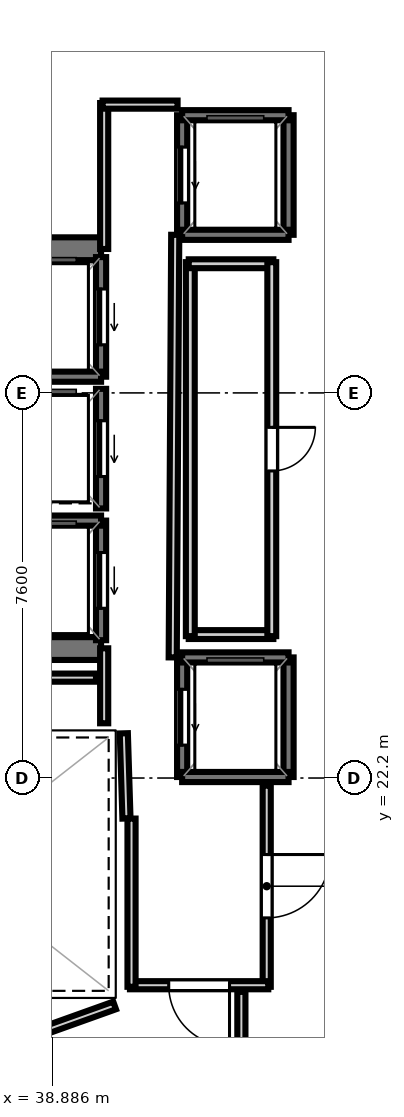
"""IFC4 building model, lengths in metres.
Left out: names, types, materials, properties, quantities, classifications, styles, units other than length and angle.
Written with IfcOpenShell. Run it as: python <this file> out.ifc"""

import sys

from ifc_helpers import new_model, si_unit, direction, frame, frame_2d, origin, place, context, subcontext, project, spatial, rectangle, extrude, element, fill, save


model = new_model("IFC4")
c1 = context("Model", 3, precision=1e-05, world=origin(), true_north=direction((0.0, 1.0)))
c2 = subcontext(c1, "Body", "Model", "MODEL_VIEW")
j1 = project(units=[si_unit("LENGTHUNIT", "METRE"), si_unit("PLANEANGLEUNIT", "RADIAN")], contexts=[c1])
p1 = place(None, origin())
s1 = spatial("IfcSite", under=j1, at=p1, CompositionType="ELEMENT")
p2 = place(p1, origin())
s2 = spatial("IfcBuilding", under=s1, at=p2, CompositionType="ELEMENT")
p3 = place(p2, frame((0.0, 0.0, 348.1)))
s3 = spatial("IfcBuildingStorey", under=s2, at=p3, CompositionType="ELEMENT", Elevation=348.1)
p4 = place(p3, frame((29.33, 32.645, 0.0), z_axis=(0.0, 0.0, 1.0), x_axis=(1.0, 0.0, 0.0)))
e1 = element("IfcWall", 1, at=p4, inside=s3, PredefinedType="SHEAR", context=c2, shape_type="SweptSolid", body=[
    extrude(rectangle(XDim=10.52, YDim=0.45, at=frame_2d((5.26, 0.0))), origin(), (0.0, 0.0, 1.0), 3.4),
])
p5 = place(p4, frame((0.895, 0.0, 0.0)))
e2 = element("IfcOpeningElement", 2, at=p5, cuts=e1, PredefinedType="OPENING", context=c2, shape_type="SweptSolid", body=[
    extrude(rectangle(XDim=1.25, YDim=2.15, at=frame_2d((0.625, 1.075))), frame((0.0, 0.235, 0.0), z_axis=(0.0, -1.0, 0.0), x_axis=(1.0, 0.0, 0.0)), (0.0, 0.0, 1.0), 0.47),
])
p6 = place(p3, frame((29.33, 24.755, 0.0), z_axis=(0.0, 0.0, 1.0), x_axis=(1.0, 0.0, 0.0)))
e3 = element("IfcWall", 3, at=p6, inside=s3, PredefinedType="SHEAR", context=c2, shape_type="SweptSolid", body=[
    extrude(rectangle(XDim=10.52, YDim=0.45, at=frame_2d((5.26, 0.0))), origin(), (0.0, 0.0, 1.0), 3.4),
])
p7 = place(p6, frame((0.695, 0.0, 0.0)))
e4 = element("IfcOpeningElement", 4, at=p7, cuts=e3, PredefinedType="OPENING", context=c2, shape_type="SweptSolid", body=[
    extrude(rectangle(XDim=1.25, YDim=2.15, at=frame_2d((0.625, 1.075))), frame((0.0, 0.235, 0.0), z_axis=(0.0, -1.0, 0.0), x_axis=(1.0, 0.0, 0.0)), (0.0, 0.0, 1.0), 0.47),
])
p8 = place(p3, frame((39.85, 30.12, 0.0), z_axis=(0.0, 0.0, 1.0), x_axis=(0.0, 1.0, 0.0)))
e5 = element("IfcWall", 5, at=p8, inside=s3, PredefinedType="SOLIDWALL", context=c2, shape_type="SweptSolid", body=[
    extrude(rectangle(XDim=2.36, YDim=0.2, at=frame_2d((1.18, 0.0))), origin(), (0.0, 0.0, 1.0), 3.4),
])
p9 = place(p8, frame((0.63, 0.0, 0.0)))
e6 = element("IfcOpeningElement", 6, at=p9, cuts=e5, PredefinedType="OPENING", context=c2, shape_type="SweptSolid", body=[
    extrude(rectangle(XDim=1.1, YDim=2.15, at=frame_2d((0.55, 1.075))), frame((0.0, 0.11, 0.0), z_axis=(0.0, -1.0, 0.0), x_axis=(1.0, 0.0, 0.0)), (0.0, 0.0, 1.0), 0.22),
])
p10 = place(p3, frame((37.75, 30.12, 0.0), z_axis=(0.0, 0.0, 1.0), x_axis=(1.0, 0.0, 0.0)))
e7 = element("IfcWall", 7, at=p10, inside=s3, PredefinedType="SOLIDWALL", context=c2, shape_type="SweptSolid", body=[
    extrude(rectangle(XDim=2.1, YDim=0.2, at=frame_2d((1.05, 0.0))), origin(), (0.0, 0.0, 1.0), 3.4),
])
p11 = place(p3, frame((39.85, 24.92, 0.0), z_axis=(0.0, 0.0, 1.0), x_axis=(0.0, 1.0, 0.0)))
e8 = element("IfcWall", 8, at=p11, inside=s3, PredefinedType="SOLIDWALL", context=c2, shape_type="SweptSolid", body=[
    extrude(rectangle(XDim=2.36, YDim=0.2, at=frame_2d((1.18, 0.0))), origin(), (0.0, 0.0, 1.0), 3.4),
])
p12 = place(p11, frame((0.63, 0.0, 0.0)))
e9 = element("IfcOpeningElement", 9, at=p12, cuts=e8, PredefinedType="OPENING", context=c2, shape_type="SweptSolid", body=[
    extrude(rectangle(XDim=1.1, YDim=2.15, at=frame_2d((0.55, 1.075))), frame((0.0, 0.11, 0.0), z_axis=(0.0, -1.0, 0.0), x_axis=(1.0, 0.0, 0.0)), (0.0, 0.0, 1.0), 0.22),
])
p13 = place(p3, frame((37.75, 27.28, 0.0), z_axis=(0.0, 0.0, 1.0), x_axis=(1.0, 0.0, 0.0)))
e10 = element("IfcWall", 10, at=p13, inside=s3, PredefinedType="SOLIDWALL", context=c2, shape_type="SweptSolid", body=[
    extrude(rectangle(XDim=2.1, YDim=0.2, at=frame_2d((1.05, 0.0))), origin(), (0.0, 0.0, 1.0), 3.4),
])
p14 = place(p3, frame((39.85, 27.52, 0.0), z_axis=(0.0, 0.0, 1.0), x_axis=(0.0, 1.0, 0.0)))
e11 = element("IfcWall", 11, at=p14, inside=s3, PredefinedType="SOLIDWALL", context=c2, shape_type="SweptSolid", body=[
    extrude(rectangle(XDim=2.36, YDim=0.2, at=frame_2d((1.18, 0.0))), origin(), (0.0, 0.0, 1.0), 3.4),
])
p15 = place(p14, frame((0.63, 0.0, 0.0)))
e12 = element("IfcOpeningElement", 12, at=p15, cuts=e11, PredefinedType="OPENING", context=c2, shape_type="SweptSolid", body=[
    extrude(rectangle(XDim=1.1, YDim=2.15, at=frame_2d((0.55, 1.075))), frame((0.0, 0.11, 0.0), z_axis=(0.0, -1.0, 0.0), x_axis=(1.0, 0.0, 0.0)), (0.0, 0.0, 1.0), 0.22),
])
p16 = place(p3, frame((43.55, 22.22, 0.0), z_axis=(0.0, 0.0, 1.0), x_axis=(0.0, 1.0, 0.0)))
e13 = element("IfcWall", 13, at=p16, inside=s3, PredefinedType="SOLIDWALL", context=c2, shape_type="SweptSolid", body=[
    extrude(rectangle(XDim=2.36, YDim=0.2, at=frame_2d((1.18, 0.0))), origin(), (0.0, 0.0, 1.0), 3.4),
])
p17 = place(p3, frame((41.45, 22.22, 0.0), z_axis=(0.0, 0.0, 1.0), x_axis=(0.0, 1.0, 0.0)))
e14 = element("IfcWall", 14, at=p17, inside=s3, PredefinedType="SOLIDWALL", context=c2, shape_type="SweptSolid", body=[
    extrude(rectangle(XDim=2.36, YDim=0.2, at=frame_2d((1.18, 0.0))), origin(), (0.0, 0.0, 1.0), 3.4),
])
p18 = place(p17, frame((0.63, 0.0, 0.0)))
e15 = element("IfcOpeningElement", 15, at=p18, cuts=e14, PredefinedType="OPENING", context=c2, shape_type="SweptSolid", body=[
    extrude(rectangle(XDim=1.1, YDim=2.15, at=frame_2d((0.55, 1.075))), frame((0.0, 0.11, 0.0), z_axis=(0.0, -1.0, 0.0), x_axis=(1.0, 0.0, 0.0)), (0.0, 0.0, 1.0), 0.22),
])
for number, where, z_axis, x_axis in (
    (16, (41.45, 24.58, 0.0), (0.0, 0.0, 1.0), (1.0, 0.0, 0.0)),
    (17, (41.45, 22.22, 0.0), (0.0, 0.0, 1.0), (1.0, 0.0, 0.0)),
):
    element("IfcWall", number, at=place(p3, frame(where, z_axis=z_axis, x_axis=x_axis)), inside=s3, PredefinedType="SOLIDWALL", context=c2, shape_type="SweptSolid", body=[
        extrude(rectangle(XDim=2.1, YDim=0.2, at=frame_2d((1.05, 0.0))), origin(), (0.0, 0.0, 1.0), 3.4),
    ])
p19 = place(p3, frame((43.55, 32.92, 0.0), z_axis=(0.0, 0.0, 1.0), x_axis=(0.0, 1.0, 0.0)))
e18 = element("IfcWall", 18, at=p19, inside=s3, PredefinedType="SOLIDWALL", context=c2, shape_type="SweptSolid", body=[
    extrude(rectangle(XDim=2.36, YDim=0.2, at=frame_2d((1.18, 0.0))), origin(), (0.0, 0.0, 1.0), 3.4),
])
p20 = place(p3, frame((41.45, 32.92, 0.0), z_axis=(0.0, 0.0, 1.0), x_axis=(0.0, 1.0, 0.0)))
e19 = element("IfcWall", 19, at=p20, inside=s3, PredefinedType="SOLIDWALL", context=c2, shape_type="SweptSolid", body=[
    extrude(rectangle(XDim=2.36, YDim=0.2, at=frame_2d((1.18, 0.0))), origin(), (0.0, 0.0, 1.0), 3.4),
])
p21 = place(p20, frame((0.63, 0.0, 0.0)))
e20 = element("IfcOpeningElement", 20, at=p21, cuts=e19, PredefinedType="OPENING", context=c2, shape_type="SweptSolid", body=[
    extrude(rectangle(XDim=1.1, YDim=2.15, at=frame_2d((0.55, 1.075))), frame((0.0, 0.11, 0.0), z_axis=(0.0, -1.0, 0.0), x_axis=(1.0, 0.0, 0.0)), (0.0, 0.0, 1.0), 0.22),
])
for number, where, z_axis, x_axis in (
    (21, (41.45, 35.28, 0.0), (0.0, 0.0, 1.0), (1.0, 0.0, 0.0)),
    (22, (41.45, 32.92, 0.0), (0.0, 0.0, 1.0), (1.0, 0.0, 0.0)),
):
    element("IfcWall", number, at=place(p3, frame(where, z_axis=z_axis, x_axis=x_axis)), inside=s3, PredefinedType="SOLIDWALL", context=c2, shape_type="SweptSolid", body=[
        extrude(rectangle(XDim=2.1, YDim=0.2, at=frame_2d((1.05, 0.0))), origin(), (0.0, 0.0, 1.0), 3.4),
    ])
p22 = place(p3, frame((40.351, 21.401, 0.0), z_axis=(0.0, 0.0, 1.0), x_axis=(-0.031058045979, 0.999517582527, 0.0)))
e23 = element("IfcWall", 23, at=p22, inside=s3, PredefinedType="PARTITIONING", context=c2, shape_type="SweptSolid", body=[
    extrude(rectangle(XDim=1.682, YDim=0.16, at=frame_2d((0.841, 0.0))), origin(), (0.0, 0.0, 1.0), 2.35),
])
p23 = place(p3, frame((39.911, 23.28, 0.0), z_axis=(0.0, 0.0, 1.0), x_axis=(0.0, 1.0, 0.0)))
e24 = element("IfcWall", 24, at=p23, inside=s3, PredefinedType="PARTITIONING", context=c2, shape_type="SweptSolid", body=[
    extrude(rectangle(XDim=1.48, YDim=0.16, at=frame_2d((0.74, 0.0))), origin(), (0.0, 0.0, 1.0), 2.35),
])
p24 = place(p3, frame((39.911, 32.64, 0.0), z_axis=(0.0, 0.0, 1.0), x_axis=(0.0, 1.0, 0.0)))
e25 = element("IfcWall", 25, at=p24, inside=s3, PredefinedType="PARTITIONING", context=c2, shape_type="SweptSolid", body=[
    extrude(rectangle(XDim=2.88, YDim=0.16, at=frame_2d((1.44, 0.0))), origin(), (0.0, 0.0, 1.0), 2.35),
])
p25 = place(p3, frame((39.88, 35.489, 0.0), z_axis=(0.0, 0.0, 1.0), x_axis=(1.0, 0.0, 0.0)))
e26 = element("IfcWall", 26, at=p25, inside=s3, PredefinedType="PARTITIONING", context=c2, shape_type="SweptSolid", body=[
    extrude(rectangle(XDim=1.48, YDim=0.16, at=frame_2d((0.74, 0.0))), origin(), (0.0, 0.0, 1.0), 2.35),
])
p26 = place(p3, frame((41.313, 32.92, 0.0), z_axis=(0.0, 0.0, 1.0), x_axis=(-0.005942518022, -0.999982343084, 0.0)))
e27 = element("IfcWall", 27, at=p26, inside=s3, PredefinedType="PARTITIONING", context=c2, shape_type="SweptSolid", body=[
    extrude(rectangle(XDim=8.34, YDim=0.16, at=frame_2d((4.17, 0.0))), origin(), (0.0, 0.0, 1.0), 2.35),
])
p27 = place(p3, frame((43.119, 22.05, 0.0), z_axis=(0.0, 0.0, 1.0), x_axis=(0.0, -1.0, 0.0)))
e28 = element("IfcWall", 28, at=p27, inside=s3, PredefinedType="PARTITIONING", context=c2, shape_type="SweptSolid", body=[
    extrude(rectangle(XDim=3.97, YDim=0.16, at=frame_2d((1.985, 0.0))), origin(), (0.0, 0.0, 1.0), 2.35),
])
p28 = place(p27, frame((1.36, 0.0, 0.0)))
e29 = element("IfcOpeningElement", 29, at=p28, cuts=e28, PredefinedType="OPENING", context=c2, shape_type="SweptSolid", body=[
    extrude(rectangle(XDim=1.25, YDim=2.2, at=frame_2d((0.625, 1.1))), frame((0.0, 0.09, 0.0), z_axis=(0.0, -1.0, 0.0), x_axis=(1.0, 0.0, 0.0)), (0.0, 0.0, 1.0), 0.18),
])
p29 = place(p3, frame((43.15, 18.111, 0.0), z_axis=(0.0, 0.0, 1.0), x_axis=(-1.0, 0.0, 0.0)))
e30 = element("IfcWall", 30, at=p29, inside=s3, PredefinedType="PARTITIONING", context=c2, shape_type="SweptSolid", body=[
    extrude(rectangle(XDim=2.73, YDim=0.16, at=frame_2d((1.365, 0.0))), origin(), (0.0, 0.0, 1.0), 2.35),
])
p30 = place(p29, frame((0.765, 0.0, 0.0)))
e31 = element("IfcOpeningElement", 31, at=p30, cuts=e30, PredefinedType="OPENING", context=c2, shape_type="SweptSolid", body=[
    extrude(rectangle(XDim=1.2, YDim=2.15, at=frame_2d((0.6, 1.075))), frame((0.0, 0.09, 0.0), z_axis=(0.0, -1.0, 0.0), x_axis=(1.0, 0.0, 0.0)), (0.0, 0.0, 1.0), 0.18),
])
p31 = place(p3, frame((40.451, 18.08, 0.0), z_axis=(0.0, 0.0, 1.0), x_axis=(0.0, 1.0, 0.0)))
e32 = element("IfcWall", 32, at=p31, inside=s3, PredefinedType="PARTITIONING", context=c2, shape_type="SweptSolid", body=[
    extrude(rectangle(XDim=3.32, YDim=0.16, at=frame_2d((1.66, 0.0))), origin(), (0.0, 0.0, 1.0), 2.35),
])
p32 = place(p3, frame((43.25, 25.031, 0.0), z_axis=(0.0, 0.0, 1.0), x_axis=(-1.0, 0.0, 0.0)))
e33 = element("IfcWall", 33, at=p32, inside=s3, PredefinedType="PLUMBINGWALL", context=c2, shape_type="SweptSolid", body=[
    extrude(rectangle(XDim=1.67, YDim=0.175, at=frame_2d((0.835, 0.0))), origin(), (0.0, 0.0, 1.0), 2.35),
])
p33 = place(p3, frame((41.611, 25.0, 0.0), z_axis=(0.0, 0.0, 1.0), x_axis=(0.0, 1.0, 0.0)))
e34 = element("IfcWall", 34, at=p33, inside=s3, PredefinedType="PLUMBINGWALL", context=c2, shape_type="SweptSolid", body=[
    extrude(rectangle(XDim=7.38, YDim=0.175, at=frame_2d((3.69, 0.0))), origin(), (0.0, 0.0, 1.0), 2.35),
])
p34 = place(p3, frame((41.58, 32.349, 0.0), z_axis=(0.0, 0.0, 1.0), x_axis=(1.0, 0.0, 0.0)))
e35 = element("IfcWall", 35, at=p34, inside=s3, PredefinedType="PLUMBINGWALL", context=c2, shape_type="SweptSolid", body=[
    extrude(rectangle(XDim=1.67, YDim=0.175, at=frame_2d((0.835, 0.0))), origin(), (0.0, 0.0, 1.0), 2.35),
])
p35 = place(p3, frame((43.219, 32.38, 0.0), z_axis=(0.0, 0.0, 1.0), x_axis=(0.0, -1.0, 0.0)))
e36 = element("IfcWall", 36, at=p35, inside=s3, PredefinedType="PLUMBINGWALL", context=c2, shape_type="SweptSolid", body=[
    extrude(rectangle(XDim=7.38, YDim=0.175, at=frame_2d((3.69, 0.0))), origin(), (0.0, 0.0, 1.0), 2.35),
])
p36 = place(p35, frame((3.26, 0.0, 0.0)))
e37 = element("IfcOpeningElement", 37, at=p36, cuts=e36, PredefinedType="OPENING", context=c2, shape_type="SweptSolid", body=[
    extrude(rectangle(XDim=0.86, YDim=2.05, at=frame_2d((0.43, 1.025))), frame((0.0, 0.097, 0.0), z_axis=(0.0, -1.0, 0.0), x_axis=(1.0, 0.0, 0.0)), (0.0, 0.0, 1.0), 0.195),
])
p37 = place(p3, frame((39.75, 24.181, 0.0), z_axis=(0.0, 0.0, 1.0), x_axis=(-1.0, 0.0, 0.0)))
e38 = element("IfcWall", 38, at=p37, inside=s3, PredefinedType="PARTITIONING", context=c2, shape_type="SweptSolid", body=[
    extrude(rectangle(XDim=6.22, YDim=0.16, at=frame_2d((3.11, 0.0))), origin(), (0.0, 0.0, 1.0), 2.35),
])
p38 = place(p3, frame((36.81, 16.529, 0.0), z_axis=(0.0, 0.0, 1.0), x_axis=(0.941548344365, 0.33687789364, 0.0)))
e39 = element("IfcWall", 39, at=p38, inside=s3, PredefinedType="PARTITIONING", context=c2, shape_type="SweptSolid", body=[
    extrude(rectangle(XDim=3.513, YDim=0.16, at=frame_2d((1.756, 0.0))), origin(), (0.0, 0.0, 1.0), 2.35),
])
p39 = place(p3, frame((42.619, 17.98, 0.0), z_axis=(0.0, 0.0, 1.0), x_axis=(0.0, -1.0, 0.0)))
e40 = element("IfcWall", 40, at=p39, inside=s3, PredefinedType="PARTITIONING", context=c2, shape_type="SweptSolid", body=[
    extrude(rectangle(XDim=1.93, YDim=0.16, at=frame_2d((0.965, 0.0))), origin(), (0.0, 0.0, 1.0), 2.35),
])
p40 = place(p3, frame((52.912, 41.152, 0.0), z_axis=(0.0, 0.0, 1.0), x_axis=(-0.322022446104, -0.946732034002, 0.0)))
e41 = element("IfcWall", 41, at=p40, inside=s3, PredefinedType="PARTITIONING", context=c2, shape_type="SweptSolid", body=[
    extrude(rectangle(XDim=35.683, YDim=0.12, at=frame_2d((17.842, 0.0))), origin(), (0.0, 0.0, 1.0), 2.178),
])
p41 = place(p9, origin())
e42 = element("IfcDoor", 42, at=p41, inside=s3, OperationType="SLIDING_TO_LEFT", PredefinedType="DOOR", context=c2, shape_type="SweptSolid", body=[
    extrude(rectangle(XDim=1.1, YDim=2.15, at=frame_2d((0.55, 1.075))), frame((0.0, 0.025, 0.0), z_axis=(0.0, -1.0, 0.0), x_axis=(1.0, 0.0, 0.0)), (0.0, 0.0, 1.0), 0.05),
])
fill(e6, e42)
p42 = place(p12, origin())
e43 = element("IfcDoor", 43, at=p42, inside=s3, OperationType="SLIDING_TO_LEFT", PredefinedType="DOOR", context=c2, shape_type="SweptSolid", body=[
    extrude(rectangle(XDim=1.1, YDim=2.15, at=frame_2d((0.55, 1.075))), frame((0.0, 0.025, 0.0), z_axis=(0.0, -1.0, 0.0), x_axis=(1.0, 0.0, 0.0)), (0.0, 0.0, 1.0), 0.05),
])
fill(e9, e43)
p43 = place(p15, origin())
e44 = element("IfcDoor", 44, at=p43, inside=s3, OperationType="SLIDING_TO_LEFT", PredefinedType="DOOR", context=c2, shape_type="SweptSolid", body=[
    extrude(rectangle(XDim=1.1, YDim=2.15, at=frame_2d((0.55, 1.075))), frame((0.0, 0.025, 0.0), z_axis=(0.0, -1.0, 0.0), x_axis=(1.0, 0.0, 0.0)), (0.0, 0.0, 1.0), 0.05),
])
fill(e12, e44)
p44 = place(p18, origin())
e45 = element("IfcDoor", 45, at=p44, inside=s3, OperationType="SLIDING_TO_LEFT", PredefinedType="DOOR", context=c2, shape_type="SweptSolid", body=[
    extrude(rectangle(XDim=1.1, YDim=2.15, at=frame_2d((0.55, 1.075))), frame((0.0, 0.025, 0.0), z_axis=(0.0, -1.0, 0.0), x_axis=(1.0, 0.0, 0.0)), (0.0, 0.0, 1.0), 0.05),
])
fill(e15, e45)
p45 = place(p21, origin())
e46 = element("IfcDoor", 46, at=p45, inside=s3, OperationType="SLIDING_TO_LEFT", PredefinedType="DOOR", context=c2, shape_type="SweptSolid", body=[
    extrude(rectangle(XDim=1.1, YDim=2.15, at=frame_2d((0.55, 1.075))), frame((0.0, 0.025, 0.0), z_axis=(0.0, -1.0, 0.0), x_axis=(1.0, 0.0, 0.0)), (0.0, 0.0, 1.0), 0.05),
])
fill(e20, e46)
p46 = place(p30, origin())
e47 = element("IfcDoor", 47, at=p46, inside=s3, OperationType="SINGLE_SWING_LEFT", PredefinedType="DOOR", context=c2, shape_type="SweptSolid", body=[
    extrude(rectangle(XDim=1.2, YDim=2.15, at=frame_2d((0.6, 1.075))), frame((0.0, 0.025, 0.0), z_axis=(0.0, -1.0, 0.0), x_axis=(1.0, 0.0, 0.0)), (0.0, 0.0, 1.0), 0.05),
])
fill(e31, e47)
p47 = place(p28, origin())
e48 = element("IfcDoor", 48, at=p47, inside=s3, OperationType="SINGLE_SWING_LEFT", PredefinedType="DOOR", context=c2, shape_type="SweptSolid", body=[
    extrude(rectangle(XDim=1.25, YDim=2.2, at=frame_2d((0.625, 1.1))), frame((0.0, 0.025, 0.0), z_axis=(0.0, -1.0, 0.0), x_axis=(1.0, 0.0, 0.0)), (0.0, 0.0, 1.0), 0.05),
])
fill(e29, e48)
p48 = place(p36, origin())
e49 = element("IfcDoor", 49, at=p48, inside=s3, OperationType="SINGLE_SWING_LEFT", PredefinedType="DOOR", context=c2, shape_type="SweptSolid", body=[
    extrude(rectangle(XDim=0.86, YDim=2.05, at=frame_2d((0.43, 1.025))), frame((0.0, 0.025, 0.0), z_axis=(0.0, -1.0, 0.0), x_axis=(1.0, 0.0, 0.0)), (0.0, 0.0, 1.0), 0.05),
])
fill(e37, e49)
save(model, sys.argv[1])
